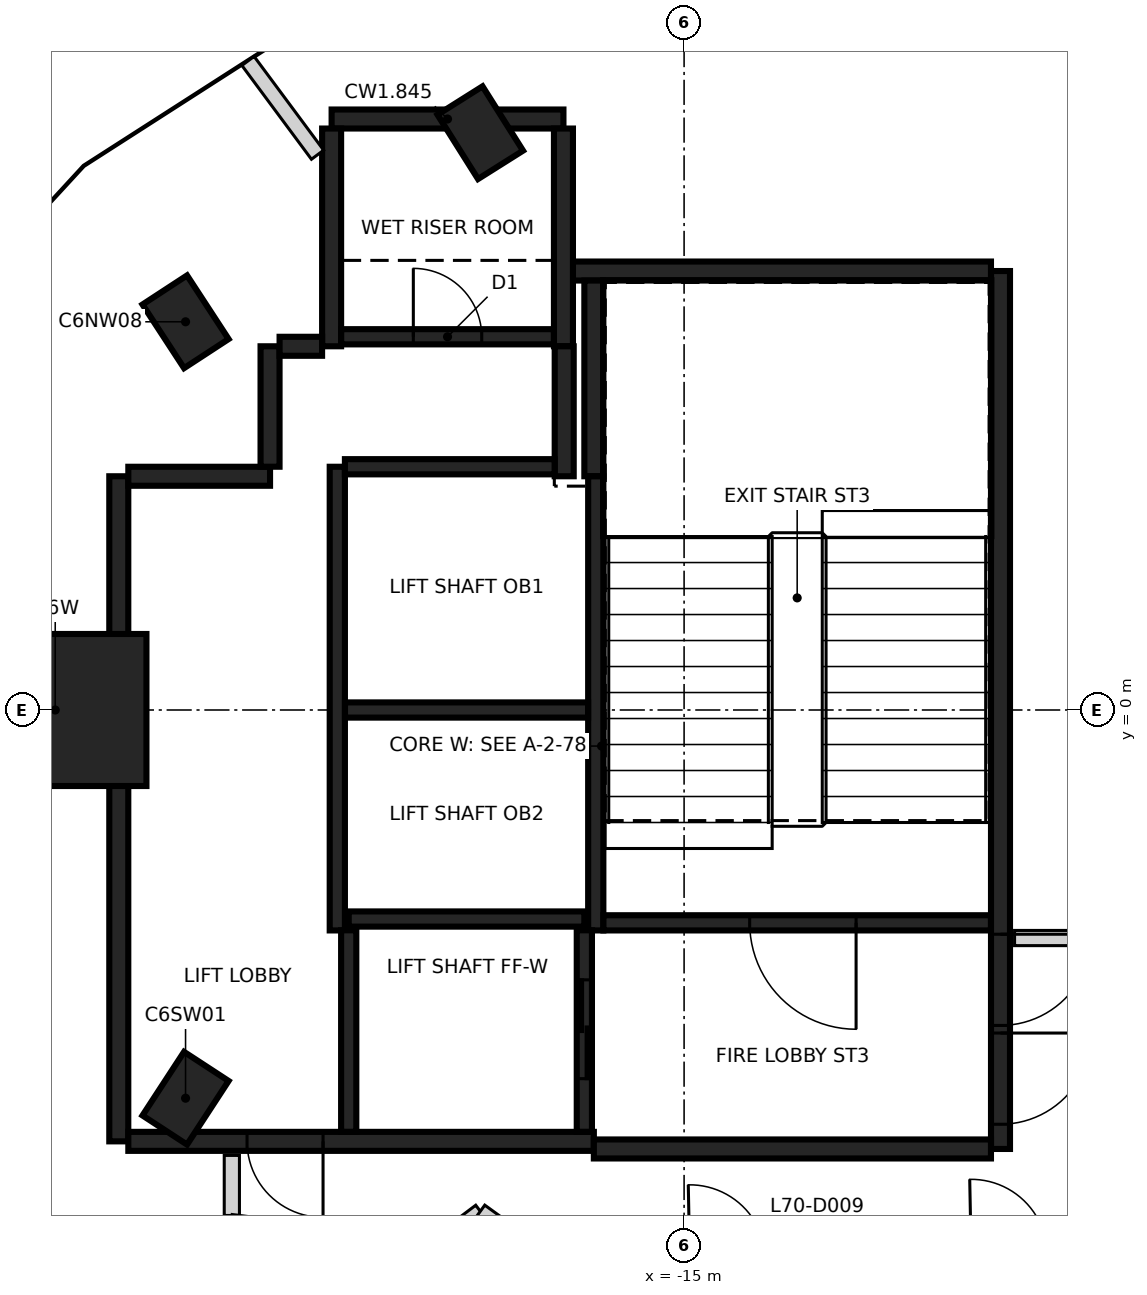
"""IFC4 building model, lengths in metres.
Left out: names, types, materials, properties, quantities, classifications, styles, units other than length and angle.
Written with IfcOpenShell. Run it as: python <this file> out.ifc"""

import sys

from ifc_helpers import new_model, si_unit, direction, frame, frame_2d, origin, origin_2d, place, context, subcontext, project, spatial, rectangle, extrude, element, fill, save


model = new_model("IFC4")
c1 = context("Model", 3, precision=1e-05, world=origin(), true_north=direction((0.0, 1.0)))
c2 = subcontext(c1, "Body", "Model", "MODEL_VIEW")
j1 = project(units=[si_unit("LENGTHUNIT", "METRE"), si_unit("PLANEANGLEUNIT", "RADIAN")], contexts=[c1])
p1 = place(None, origin())
s1 = spatial("IfcSite", under=j1, at=p1, CompositionType="ELEMENT")
p2 = place(p1, origin())
s2 = spatial("IfcBuilding", under=s1, at=p2, CompositionType="ELEMENT")
p3 = place(p2, frame((0.0, 0.0, 276.6)))
s3 = spatial("IfcBuildingStorey", under=s2, at=p3, CompositionType="ELEMENT", Elevation=276.6)
for number, where, z_axis, x_axis in (
    (1, (-17.681, 7.595, -0.35), (0.0, 0.0, 1.0), (-0.533, 0.846, 0.0)),
    (2, (-21.559, 5.107, -0.35), (0.0, 0.0, 1.0), (-0.547, 0.837, 0.0)),
    (3, (-21.559, -5.107, -0.35), (0.0, 0.0, 1.0), (0.547, 0.837, 0.0)),
):
    element("IfcColumn", number, at=place(p3, frame(where, z_axis=z_axis, x_axis=x_axis)), inside=s3, PredefinedType="COLUMN", context=c2, shape_type="SweptSolid", body=[
        extrude(rectangle(XDim=1.0, YDim=0.7, at=origin_2d()), origin(), (0.0, 0.0, 1.0), 3.6),
    ])
p4 = place(p3, frame((-23.273, 0.0, -0.35), z_axis=(0.0, 0.0, 1.0), x_axis=(1.0, 0.0, 0.0)))
e4 = element("IfcColumn", 4, at=p4, inside=s3, PredefinedType="COLUMN", context=c2, shape_type="SweptSolid", body=[
    extrude(rectangle(XDim=2.4, YDim=2.0, at=origin_2d()), origin(), (0.0, 0.0, 1.0), 3.6),
])
p5 = place(p3, frame((-10.837, 5.775, 0.0), z_axis=(0.0, 0.0, 1.0), x_axis=(0.0, -1.0, 0.0)))
e5 = element("IfcWall", 5, at=p5, inside=s3, PredefinedType="SHEAR", context=c2, shape_type="SweptSolid", body=[
    extrude(rectangle(XDim=11.55, YDim=0.25, at=frame_2d((5.775, 0.0))), origin(), (0.0, 0.0, 1.0), 3.25),
])
p6 = place(p5, frame((10.025, 0.0, 0.0)))
e6 = element("IfcOpeningElement", 6, at=p6, cuts=e5, PredefinedType="OPENING", context=c2, shape_type="SweptSolid", body=[
    extrude(rectangle(XDim=1.2, YDim=2.1, at=frame_2d((0.6, 1.05))), frame((0.0, 0.135, 0.0), z_axis=(0.0, -1.0, 0.0), x_axis=(1.0, 0.0, 0.0)), (0.0, 0.0, 1.0), 0.27),
])
p7 = place(p5, frame((8.725, 0.0, 0.0)))
e7 = element("IfcOpeningElement", 7, at=p7, cuts=e5, PredefinedType="OPENING", context=c2, shape_type="SweptSolid", body=[
    extrude(rectangle(XDim=1.2, YDim=2.1, at=frame_2d((0.6, 1.05))), frame((0.0, 0.135, 0.0), z_axis=(0.0, -1.0, 0.0), x_axis=(1.0, 0.0, 0.0)), (0.0, 0.0, 1.0), 0.27),
])
p8 = place(p3, frame((-22.437, -5.675, 0.0), z_axis=(0.0, 0.0, 1.0), x_axis=(0.0, 1.0, 0.0)))
e8 = element("IfcWall", 8, at=p8, inside=s3, PredefinedType="SHEAR", context=c2, shape_type="SweptSolid", body=[
    extrude(rectangle(XDim=8.75, YDim=0.25, at=frame_2d((4.375, 0.0))), origin(), (0.0, 0.0, 1.0), 3.25),
])
p9 = place(p3, frame((-16.187, -5.675, 0.0), z_axis=(0.0, 0.0, 1.0), x_axis=(-1.0, 0.0, 0.0)))
e9 = element("IfcWall", 9, at=p9, inside=s3, PredefinedType="SHEAR", context=c2, shape_type="SweptSolid", body=[
    extrude(rectangle(XDim=6.125, YDim=0.25, at=frame_2d((3.062, 0.0))), origin(), (0.0, 0.0, 1.0), 3.25),
])
p10 = place(p9, frame((3.563, 0.0, 0.0)))
e10 = element("IfcOpeningElement", 10, at=p10, cuts=e9, PredefinedType="OPENING", context=c2, shape_type="SweptSolid", body=[
    extrude(rectangle(XDim=1.0, YDim=2.1, at=frame_2d((0.5, 1.05))), frame((0.0, 0.135, 0.0), z_axis=(0.0, -1.0, 0.0), x_axis=(1.0, 0.0, 0.0)), (0.0, 0.0, 1.0), 0.27),
])
p11 = place(p3, frame((-10.963, -5.775, 0.0), z_axis=(0.0, 0.0, 1.0), x_axis=(-1.0, 0.0, 0.0)))
e11 = element("IfcWall", 11, at=p11, inside=s3, PredefinedType="SHEAR", context=c2, shape_type="SweptSolid", body=[
    extrude(rectangle(XDim=5.225, YDim=0.25, at=frame_2d((2.612, 0.0))), origin(), (0.0, 0.0, 1.0), 3.25),
])
p12 = place(p3, frame((-16.472, 5.775, 0.0), z_axis=(0.0, 0.0, 1.0), x_axis=(1.0, 0.0, 0.0)))
e12 = element("IfcWall", 12, at=p12, inside=s3, PredefinedType="SHEAR", context=c2, shape_type="SweptSolid", body=[
    extrude(rectangle(XDim=5.51, YDim=0.25, at=frame_2d((2.755, 0.0))), origin(), (0.0, 0.0, 1.0), 3.25),
])
p13 = place(p3, frame((-19.637, 7.775, 0.0), z_axis=(0.0, 0.0, 1.0), x_axis=(1.0, 0.0, 0.0)))
e13 = element("IfcWall", 13, at=p13, inside=s3, PredefinedType="SHEAR", context=c2, shape_type="SweptSolid", body=[
    extrude(rectangle(XDim=3.05, YDim=0.25, at=frame_2d((1.525, 0.0))), origin(), (0.0, 0.0, 1.0), 3.25),
])
for number, where, z_axis, x_axis in (
    (14, (-16.587, 7.65, 0.0), (0.0, 0.0, 1.0), (0.0, -1.0, 0.0)),
    (15, (-19.637, 4.785, 0.0), (0.0, 0.0, 1.0), (0.0, 1.0, 0.0)),
):
    element("IfcWall", number, at=place(p3, frame(where, z_axis=z_axis, x_axis=x_axis)), inside=s3, PredefinedType="SHEAR", context=c2, shape_type="SweptSolid", body=[
        extrude(rectangle(XDim=2.865, YDim=0.25, at=frame_2d((1.432, 0.0))), origin(), (0.0, 0.0, 1.0), 3.25),
    ])
p14 = place(p3, frame((-16.187, 3.075, 0.0), z_axis=(0.0, 0.0, 1.0), x_axis=(0.0, 1.0, 0.0)))
e16 = element("IfcWall", 16, at=p14, inside=s3, PredefinedType="SHEAR", context=c2, shape_type="SweptSolid", body=[
    extrude(rectangle(XDim=2.575, YDim=0.25, at=frame_2d((1.287, 0.0))), origin(), (0.0, 0.0, 1.0), 3.25),
])
p15 = place(p3, frame((-22.312, 3.075, 0.0), z_axis=(0.0, 0.0, 1.0), x_axis=(1.0, 0.0, 0.0)))
e17 = element("IfcWall", 17, at=p15, inside=s3, PredefinedType="SHEAR", context=c2, shape_type="SweptSolid", body=[
    extrude(rectangle(XDim=1.865, YDim=0.25, at=frame_2d((0.932, 0.0))), origin(), (0.0, 0.0, 1.0), 3.25),
])
p16 = place(p3, frame((-16.577, 4.785, 0.0), z_axis=(0.0, 0.0, 1.0), x_axis=(0.0, -1.0, 0.0)))
e18 = element("IfcWall", 18, at=p16, inside=s3, PredefinedType="SHEAR", context=c2, shape_type="SweptSolid", body=[
    extrude(rectangle(XDim=1.71, YDim=0.25, at=frame_2d((0.855, 0.0))), origin(), (0.0, 0.0, 1.0), 3.25),
])
p17 = place(p3, frame((-20.447, 3.2, 0.0), z_axis=(0.0, 0.0, 1.0), x_axis=(0.0, 1.0, 0.0)))
e19 = element("IfcWall", 19, at=p17, inside=s3, PredefinedType="SHEAR", context=c2, shape_type="SweptSolid", body=[
    extrude(rectangle(XDim=1.584, YDim=0.25, at=frame_2d((0.792, 0.0))), origin(), (0.0, 0.0, 1.0), 3.25),
])
p18 = place(p3, frame((-20.322, 4.785, 0.0), z_axis=(0.0, 0.0, 1.0), x_axis=(1.0, 0.0, 0.0)))
e20 = element("IfcWall", 20, at=p18, inside=s3, PredefinedType="SHEAR", context=c2, shape_type="SweptSolid", body=[
    extrude(rectangle(XDim=0.559, YDim=0.25, at=frame_2d((0.28, 0.0))), origin(), (0.0, 0.0, 1.0), 3.25),
])
p19 = place(p3, frame((-16.162, 3.074, 0.0), z_axis=(0.0, 0.0, 1.0), x_axis=(0.0, -1.0, 0.0)))
e21 = element("IfcWall", 21, at=p19, inside=s3, PredefinedType="SHEAR", context=c2, shape_type="SweptSolid", body=[
    extrude(rectangle(XDim=5.974, YDim=0.2, at=frame_2d((2.987, 0.0))), origin(), (0.0, 0.0, 1.0), 3.25),
])
p20 = place(p3, frame((-19.562, -2.9, 0.0), z_axis=(0.0, 0.0, 1.0), x_axis=(0.0, 1.0, 0.0)))
e22 = element("IfcWall", 22, at=p20, inside=s3, PredefinedType="SHEAR", context=c2, shape_type="SweptSolid", body=[
    extrude(rectangle(XDim=6.1, YDim=0.2, at=frame_2d((3.05, 0.0))), origin(), (0.0, 0.0, 1.0), 3.25),
])
p21 = place(p3, frame((-10.963, -2.8, 0.0), z_axis=(0.0, 0.0, 1.0), x_axis=(-1.0, 0.0, 0.0)))
e23 = element("IfcWall", 23, at=p21, inside=s3, PredefinedType="SHEAR", context=c2, shape_type="SweptSolid", body=[
    extrude(rectangle(XDim=5.098, YDim=0.2, at=frame_2d((2.549, 0.0))), origin(), (0.0, 0.0, 1.0), 3.25),
])
p22 = place(p21, frame((1.774, 0.0, 0.0)))
e24 = element("IfcOpeningElement", 24, at=p22, cuts=e23, PredefinedType="OPENING", context=c2, shape_type="SweptSolid", body=[
    extrude(rectangle(XDim=1.4, YDim=2.1, at=frame_2d((0.7, 1.05))), frame((0.0, 0.11, 0.0), z_axis=(0.0, -1.0, 0.0), x_axis=(1.0, 0.0, 0.0)), (0.0, 0.0, 1.0), 0.22),
])
p23 = place(p3, frame((-16.263, 0.0, 0.0), z_axis=(0.0, 0.0, 1.0), x_axis=(-1.0, 0.0, 0.0)))
e25 = element("IfcWall", 25, at=p23, inside=s3, PredefinedType="SHEAR", context=c2, shape_type="SweptSolid", body=[
    extrude(rectangle(XDim=3.198, YDim=0.2, at=frame_2d((1.599, 0.0))), origin(), (0.0, 0.0, 1.0), 3.25),
])
p24 = place(p3, frame((-19.511, 4.91, 0.0), z_axis=(0.0, 0.0, 1.0), x_axis=(1.0, 0.0, 0.0)))
e26 = element("IfcWall", 26, at=p24, inside=s3, PredefinedType="SHEAR", context=c2, shape_type="SweptSolid", body=[
    extrude(rectangle(XDim=2.798, YDim=0.2, at=frame_2d((1.399, 0.0))), origin(), (0.0, 0.0, 1.0), 3.25),
])
p25 = place(p24, frame((0.949, 0.0, 0.0)))
e27 = element("IfcOpeningElement", 27, at=p25, cuts=e26, PredefinedType="OPENING", context=c2, shape_type="SweptSolid", body=[
    extrude(rectangle(XDim=0.9, YDim=2.1, at=frame_2d((0.45, 1.05))), frame((0.0, 0.11, 0.0), z_axis=(0.0, -1.0, 0.0), x_axis=(1.0, 0.0, 0.0)), (0.0, 0.0, 1.0), 0.22),
])
p26 = place(p3, frame((-19.462, 3.2, 0.0), z_axis=(0.0, 0.0, 1.0), x_axis=(1.0, 0.0, 0.0)))
e28 = element("IfcWall", 28, at=p26, inside=s3, PredefinedType="SHEAR", context=c2, shape_type="SweptSolid", body=[
    extrude(rectangle(XDim=2.759, YDim=0.2, at=frame_2d((1.379, 0.0))), origin(), (0.0, 0.0, 1.0), 3.25),
])
p27 = place(p3, frame((-19.412, -2.75, 0.0), z_axis=(0.0, 0.0, 1.0), x_axis=(1.0, 0.0, 0.0)))
e29 = element("IfcWall", 29, at=p27, inside=s3, PredefinedType="SHEAR", context=c2, shape_type="SweptSolid", body=[
    extrude(rectangle(XDim=3.1, YDim=0.2, at=frame_2d((1.55, 0.0))), origin(), (0.0, 0.0, 1.0), 3.25),
])
p28 = place(p3, frame((-16.312, -2.898, 0.0), z_axis=(0.0, 0.0, 1.0), x_axis=(0.0, -1.0, 0.0)))
e30 = element("IfcWall", 30, at=p28, inside=s3, PredefinedType="SHEAR", context=c2, shape_type="SweptSolid", body=[
    extrude(rectangle(XDim=2.651, YDim=0.2, at=frame_2d((1.325, 0.0))), origin(), (0.0, 0.0, 1.0), 3.25),
])
p29 = place(p28, frame((0.652, 0.0, 0.0)))
e31 = element("IfcOpeningElement", 31, at=p29, cuts=e30, PredefinedType="OPENING", context=c2, shape_type="SweptSolid", body=[
    extrude(rectangle(XDim=1.3, YDim=2.1, at=frame_2d((0.65, 1.05))), frame((0.0, 0.11, 0.0), z_axis=(0.0, -1.0, 0.0), x_axis=(1.0, 0.0, 0.0)), (0.0, 0.0, 1.0), 0.22),
])
p30 = place(p3, frame((-19.412, -5.549, 0.0), z_axis=(0.0, 0.0, 1.0), x_axis=(0.0, 1.0, 0.0)))
e32 = element("IfcWall", 32, at=p30, inside=s3, PredefinedType="SHEAR", context=c2, shape_type="SweptSolid", body=[
    extrude(rectangle(XDim=2.651, YDim=0.2, at=frame_2d((1.325, 0.0))), origin(), (0.0, 0.0, 1.0), 3.25),
])
p31 = place(p3, frame((-20.95, -6.65, 0.0), z_axis=(0.0, 0.0, 1.0), x_axis=(0.0, 1.0, 0.0)))
e33 = element("IfcWall", 33, at=p31, inside=s3, PredefinedType="PARTITIONING", context=c2, shape_type="SweptSolid", body=[
    extrude(rectangle(XDim=0.79, YDim=0.2, at=frame_2d((0.395, 0.0))), origin(), (0.0, 0.0, 1.0), 3.25),
])
p32 = place(p3, frame((-20.936, -7.363, 0.0), z_axis=(0.0, 0.0, 1.0), x_axis=(0.125330520795, 0.992115044013, 0.0)))
e34 = element("IfcWall", 34, at=p32, inside=s3, PredefinedType="PARTITIONING", context=c2, shape_type="SweptSolid", body=[
    extrude(rectangle(XDim=0.719, YDim=0.2, at=frame_2d((0.359, 0.0))), origin(), (0.0, 0.0, 1.0), 3.25),
])
p33 = place(p3, frame((-18.642, -7.319, 0.0), z_axis=(0.0, 0.0, 1.0), x_axis=(0.798707882989, 0.601718968998, 0.0)))
e35 = element("IfcWall", 35, at=p33, inside=s3, PredefinedType="PARTITIONING", context=c2, shape_type="SweptSolid", body=[
    extrude(rectangle(XDim=1.203, YDim=0.2, at=frame_2d((0.602, 0.0))), origin(), (0.0, 0.0, 1.0), 2.35),
])
p34 = place(p3, frame((-17.681, -6.595, 0.0), z_axis=(0.0, 0.0, 1.0), x_axis=(0.810123213102, -0.586259652026, 0.0)))
e36 = element("IfcWall", 36, at=p34, inside=s3, PredefinedType="PARTITIONING", context=c2, shape_type="SweptSolid", body=[
    extrude(rectangle(XDim=1.17, YDim=0.2, at=frame_2d((0.585, 0.0))), origin(), (0.0, 0.0, 1.0), 3.25),
])
p35 = place(p3, frame((-10.652, -3.0, 0.0), z_axis=(0.0, 0.0, 1.0), x_axis=(1.0, 0.0, 0.0)))
e37 = element("IfcWall", 37, at=p35, inside=s3, PredefinedType="PARTITIONING", context=c2, shape_type="SweptSolid", body=[
    extrude(rectangle(XDim=0.994, YDim=0.2, at=frame_2d((0.497, 0.0))), origin(), (0.0, 0.0, 1.0), 3.25),
])
p36 = place(p3, frame((-10.023, -7.151, 0.0), z_axis=(0.0, 0.0, 1.0), x_axis=(0.668804583793, 0.743438248073, 0.0)))
e38 = element("IfcWall", 38, at=p36, inside=s3, PredefinedType="PARTITIONING", context=c2, shape_type="SweptSolid", body=[
    extrude(rectangle(XDim=2.021, YDim=0.2, at=frame_2d((1.011, 0.0))), origin(), (0.0, 0.0, 1.0), 3.25),
])
p37 = place(p3, frame((-20.738, 8.539, 0.0), z_axis=(0.0, 0.0, 1.0), x_axis=(0.595694844153, -0.803210839475, 0.0)))
e39 = element("IfcWall", 39, at=p37, inside=s3, PredefinedType="PARTITIONING", context=c2, shape_type="SweptSolid", body=[
    extrude(rectangle(XDim=1.536, YDim=0.2, at=frame_2d((0.768, 0.0))), origin(), (0.0, 0.0, 1.0), 3.25),
])
p38 = place(p3, frame((-11.035, 14.505, 0.0), z_axis=(0.0, 0.0, 1.0), x_axis=(0.499989597041, -0.866031409852, 0.0)))
e40 = element("IfcWall", 40, at=p38, inside=s3, PredefinedType="PARTITIONING", context=c2, shape_type="SweptSolid", body=[
    extrude(rectangle(XDim=13.079, YDim=0.2, at=frame_2d((6.54, 0.0))), origin(), (0.0, 0.0, 1.0), 3.25),
])
p39 = place(p29, origin())
e41 = element("IfcDoor", 41, at=p39, inside=s3, OperationType="SLIDING_TO_RIGHT", PredefinedType="DOOR", context=c2, shape_type="SweptSolid", body=[
    extrude(rectangle(XDim=1.3, YDim=2.1, at=frame_2d((0.65, 1.05))), frame((0.0, 0.025, 0.0), z_axis=(0.0, -1.0, 0.0), x_axis=(1.0, 0.0, 0.0)), (0.0, 0.0, 1.0), 0.05),
])
fill(e31, e41)
p40 = place(p10, origin())
e42 = element("IfcDoor", 42, at=p40, inside=s3, OperationType="SINGLE_SWING_LEFT", PredefinedType="DOOR", context=c2, shape_type="SweptSolid", body=[
    extrude(rectangle(XDim=1.0, YDim=2.1, at=frame_2d((0.5, 1.05))), frame((0.0, 0.025, 0.0), z_axis=(0.0, -1.0, 0.0), x_axis=(1.0, 0.0, 0.0)), (0.0, 0.0, 1.0), 0.05),
])
fill(e10, e42)
p41 = place(p6, origin())
e43 = element("IfcDoor", 43, at=p41, inside=s3, OperationType="SINGLE_SWING_LEFT", PredefinedType="DOOR", context=c2, shape_type="SweptSolid", body=[
    extrude(rectangle(XDim=1.2, YDim=2.1, at=frame_2d((0.6, 1.05))), frame((0.0, 0.025, 0.0), z_axis=(0.0, -1.0, 0.0), x_axis=(1.0, 0.0, 0.0)), (0.0, 0.0, 1.0), 0.05),
])
fill(e6, e43)
p42 = place(p7, origin())
e44 = element("IfcDoor", 44, at=p42, inside=s3, OperationType="SINGLE_SWING_RIGHT", PredefinedType="DOOR", context=c2, shape_type="SweptSolid", body=[
    extrude(rectangle(XDim=1.2, YDim=2.1, at=frame_2d((0.6, 1.05))), frame((0.0, 0.025, 0.0), z_axis=(0.0, -1.0, 0.0), x_axis=(1.0, 0.0, 0.0)), (0.0, 0.0, 1.0), 0.05),
])
fill(e7, e44)
p43 = place(p22, origin())
e45 = element("IfcDoor", 45, at=p43, inside=s3, OperationType="SINGLE_SWING_RIGHT", PredefinedType="DOOR", context=c2, shape_type="SweptSolid", body=[
    extrude(rectangle(XDim=1.4, YDim=2.1, at=frame_2d((0.7, 1.05))), frame((0.0, 0.025, 0.0), z_axis=(0.0, -1.0, 0.0), x_axis=(1.0, 0.0, 0.0)), (0.0, 0.0, 1.0), 0.05),
])
fill(e24, e45)
p44 = place(p25, origin())
e46 = element("IfcDoor", 46, at=p44, inside=s3, OperationType="SINGLE_SWING_LEFT", PredefinedType="DOOR", context=c2, shape_type="SweptSolid", body=[
    extrude(rectangle(XDim=0.9, YDim=2.1, at=frame_2d((0.45, 1.05))), frame((0.0, 0.025, 0.0), z_axis=(0.0, -1.0, 0.0), x_axis=(1.0, 0.0, 0.0)), (0.0, 0.0, 1.0), 0.05),
])
fill(e27, e46)
save(model, sys.argv[1])
